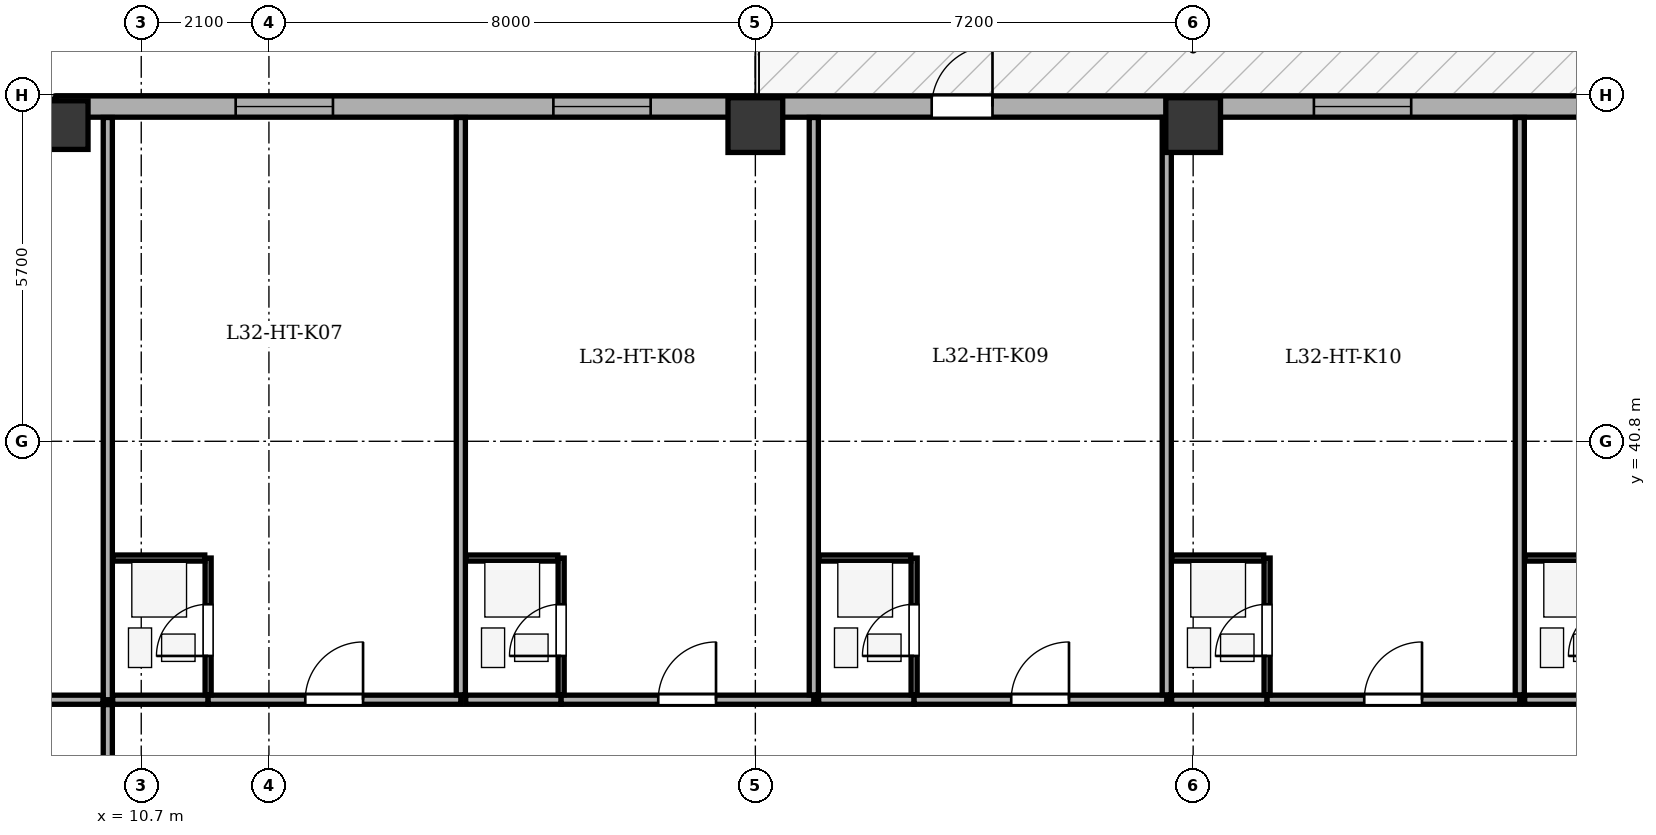
"""IFC4 building model, lengths in metres.
Left out: names, types, materials, properties, quantities, classifications, styles, units other than length and angle.
Written with IfcOpenShell. Run it as: python <this file> out.ifc"""

import sys

from ifc_helpers import new_model, si_unit, direction, frame, frame_2d, origin, origin_2d, place, context, subcontext, project, spatial, rectangle, extrude, element, fill, save


model = new_model("IFC4")
c1 = context("Model", 3, precision=1e-05, world=origin(), true_north=direction((0.0, 1.0)))
c2 = subcontext(c1, "Body", "Model", "MODEL_VIEW")
j1 = project(units=[si_unit("LENGTHUNIT", "METRE"), si_unit("PLANEANGLEUNIT", "RADIAN")], contexts=[c1])
p1 = place(None, origin())
s1 = spatial("IfcSite", under=j1, at=p1, CompositionType="ELEMENT")
p2 = place(p1, origin())
s2 = spatial("IfcBuilding", under=s1, at=p2, CompositionType="ELEMENT")
p3 = place(p2, frame((0.0, 0.0, 130.8)))
s3 = spatial("IfcBuildingStorey", under=s2, at=p3, CompositionType="ELEMENT", Elevation=130.8)
p4 = place(p3, frame((9.3, 46.0, 0.0), z_axis=(0.0, 0.0, 1.0), x_axis=(1.0, 0.0, 0.0)))
e1 = element("IfcColumn", 1, at=p4, inside=s3, PredefinedType="COLUMN", context=c2, shape_type="SweptSolid", body=[
    extrude(rectangle(XDim=0.8, YDim=1.05, at=origin_2d()), origin(), (0.0, 0.0, 1.0), 3.5),
])
for number, where, z_axis, x_axis in (
    (2, (20.8, 46.0, 0.0), (0.0, 0.0, 1.0), (1.0, 0.0, 0.0)),
    (3, (28.0, 46.0, 0.0), (0.0, 0.0, 1.0), (1.0, 0.0, 0.0)),
):
    element("IfcColumn", number, at=place(p3, frame(where, z_axis=z_axis, x_axis=x_axis)), inside=s3, PredefinedType="COLUMN", context=c2, shape_type="SweptSolid", body=[
        extrude(rectangle(XDim=0.9, YDim=0.9, at=origin_2d()), origin(), (0.0, 0.0, 1.0), 3.5),
    ])
p5 = place(p3, frame((4.495, 41.5, 0.0), z_axis=(0.0, 0.0, 1.0), x_axis=(0.707106781187, 0.707106781187, 0.0)))
e4 = element("IfcWall", 4, at=p5, inside=s3, PredefinedType="STANDARD", context=c2, shape_type="SweptSolid", body=[
    extrude(rectangle(XDim=6.795, YDim=0.35, at=frame_2d((3.397, 0.0))), origin(), (0.0, 0.0, 1.0), 2.785),
])
p6 = place(p5, frame((2.698, 0.0, 0.75)))
e5 = element("IfcOpeningElement", 5, at=p6, cuts=e4, PredefinedType="OPENING", context=c2, shape_type="SweptSolid", body=[
    extrude(rectangle(XDim=1.4, YDim=1.65, at=frame_2d((0.7, 0.825))), frame((0.0, 0.185, 0.0), z_axis=(0.0, -1.0, 0.0), x_axis=(1.0, 0.0, 0.0)), (0.0, 0.0, 1.0), 0.37),
])
p7 = place(p3, frame((9.3, 46.305, 0.0), z_axis=(0.0, 0.0, 1.0), x_axis=(1.0, 0.0, 0.0)))
e6 = element("IfcWall", 6, at=p7, inside=s3, PredefinedType="STANDARD", context=c2, shape_type="SweptSolid", body=[
    extrude(rectangle(XDim=35.0, YDim=0.35, at=frame_2d((17.5, 0.0))), origin(), (0.0, 0.0, 1.0), 2.785),
])
p8 = place(p7, frame((14.4, 0.0, 0.0)))
e7 = element("IfcOpeningElement", 7, at=p8, cuts=e6, PredefinedType="OPENING", context=c2, shape_type="SweptSolid", body=[
    extrude(rectangle(XDim=1.0, YDim=2.02, at=frame_2d((0.5, 1.01))), frame((0.0, 0.185, 0.0), z_axis=(0.0, -1.0, 0.0), x_axis=(1.0, 0.0, 0.0)), (0.0, 0.0, 1.0), 0.37),
])
p9 = place(p7, frame((2.953, 0.0, 0.75)))
e8 = element("IfcOpeningElement", 8, at=p9, cuts=e6, PredefinedType="OPENING", context=c2, shape_type="SweptSolid", body=[
    extrude(rectangle(XDim=1.6, YDim=1.75, at=frame_2d((0.8, 0.875))), frame((0.0, 0.185, 0.0), z_axis=(0.0, -1.0, 0.0), x_axis=(1.0, 0.0, 0.0)), (0.0, 0.0, 1.0), 0.37),
])
p10 = place(p7, frame((8.178, 0.0, 0.75)))
e9 = element("IfcOpeningElement", 9, at=p10, cuts=e6, PredefinedType="OPENING", context=c2, shape_type="SweptSolid", body=[
    extrude(rectangle(XDim=1.6, YDim=1.75, at=frame_2d((0.8, 0.875))), frame((0.0, 0.185, 0.0), z_axis=(0.0, -1.0, 0.0), x_axis=(1.0, 0.0, 0.0)), (0.0, 0.0, 1.0), 0.37),
])
p11 = place(p7, frame((20.686, 0.0, 0.75)))
e10 = element("IfcOpeningElement", 10, at=p11, cuts=e6, PredefinedType="OPENING", context=c2, shape_type="SweptSolid", body=[
    extrude(rectangle(XDim=1.6, YDim=1.75, at=frame_2d((0.8, 0.875))), frame((0.0, 0.185, 0.0), z_axis=(0.0, -1.0, 0.0), x_axis=(1.0, 0.0, 0.0)), (0.0, 0.0, 1.0), 0.37),
])
p12 = place(p7, frame((27.143, 0.0, 0.75)))
e11 = element("IfcOpeningElement", 11, at=p12, cuts=e6, PredefinedType="OPENING", context=c2, shape_type="SweptSolid", body=[
    extrude(rectangle(XDim=1.35, YDim=1.75, at=frame_2d((0.675, 0.875))), frame((0.0, 0.185, 0.0), z_axis=(0.0, -1.0, 0.0), x_axis=(1.0, 0.0, 0.0)), (0.0, 0.0, 1.0), 0.37),
])
p13 = place(p7, frame((31.33, 0.0, 0.75)))
e12 = element("IfcOpeningElement", 12, at=p13, cuts=e6, PredefinedType="OPENING", context=c2, shape_type="SweptSolid", body=[
    extrude(rectangle(XDim=1.6, YDim=1.75, at=frame_2d((0.8, 0.875))), frame((0.0, 0.185, 0.0), z_axis=(0.0, -1.0, 0.0), x_axis=(1.0, 0.0, 0.0)), (0.0, 0.0, 1.0), 0.37),
])
p14 = place(p3, frame((10.15, 36.55, 0.0), z_axis=(0.0, 0.0, 1.0), x_axis=(0.0, 1.0, 0.0)))
e13 = element("IfcWall", 13, at=p14, inside=s3, PredefinedType="PARTITIONING", context=c2, shape_type="SweptSolid", body=[
    extrude(rectangle(XDim=9.575, YDim=0.15, at=frame_2d((4.788, 0.0))), origin(), (0.0, 0.0, 1.0), 3.2),
])
p15 = place(p3, frame((10.23, 36.55, 0.0), z_axis=(0.0, 0.0, 1.0), x_axis=(1.0, 0.0, 0.0)))
e14 = element("IfcWall", 14, at=p15, inside=s3, PredefinedType="PARTITIONING", context=c2, shape_type="SweptSolid", body=[
    extrude(rectangle(XDim=1.57, YDim=0.15, at=frame_2d((0.785, 0.0))), origin(), (0.0, 0.0, 1.0), 3.2),
])
p16 = place(p3, frame((11.8, 36.55, 0.0), z_axis=(0.0, 0.0, 1.0), x_axis=(1.0, 0.0, 0.0)))
e15 = element("IfcWall", 15, at=p16, inside=s3, PredefinedType="PARTITIONING", context=c2, shape_type="SweptSolid", body=[
    extrude(rectangle(XDim=4.156, YDim=0.15, at=frame_2d((2.078, 0.0))), origin(), (0.0, 0.0, 1.0), 3.2),
])
p17 = place(p16, frame((1.598, 0.0, 0.0)))
e16 = element("IfcOpeningElement", 16, at=p17, cuts=e15, PredefinedType="OPENING", context=c2, shape_type="SweptSolid", body=[
    extrude(rectangle(XDim=0.95, YDim=2.1, at=frame_2d((0.475, 1.05))), frame((0.0, 0.085, 0.0), z_axis=(0.0, -1.0, 0.0), x_axis=(1.0, 0.0, 0.0)), (0.0, 0.0, 1.0), 0.17),
])
p18 = place(p3, frame((11.8, 36.63, 0.0), z_axis=(0.0, 0.0, 1.0), x_axis=(0.0, 1.0, 0.0)))
e17 = element("IfcWall", 17, at=p18, inside=s3, PredefinedType="PARTITIONING", context=c2, shape_type="SweptSolid", body=[
    extrude(rectangle(XDim=2.25, YDim=0.1, at=frame_2d((1.125, 0.0))), origin(), (0.0, 0.0, 1.0), 3.2),
])
p19 = place(p18, frame((0.64, 0.0, 0.0)))
e18 = element("IfcOpeningElement", 18, at=p19, cuts=e17, PredefinedType="OPENING", context=c2, shape_type="SweptSolid", body=[
    extrude(rectangle(XDim=0.85, YDim=2.05, at=frame_2d((0.425, 1.025))), frame((0.0, 0.06, 0.0), z_axis=(0.0, -1.0, 0.0), x_axis=(1.0, 0.0, 0.0)), (0.0, 0.0, 1.0), 0.12),
])
p20 = place(p3, frame((10.23, 38.88, 0.0), z_axis=(0.0, 0.0, 1.0), x_axis=(1.0, 0.0, 0.0)))
e19 = element("IfcWall", 19, at=p20, inside=s3, PredefinedType="PARTITIONING", context=c2, shape_type="SweptSolid", body=[
    extrude(rectangle(XDim=1.515, YDim=0.1, at=frame_2d((0.758, 0.0))), origin(), (0.0, 0.0, 1.0), 3.2),
])
p21 = place(p3, frame((15.956, 36.63, 0.0), z_axis=(0.0, 0.0, 1.0), x_axis=(0.0, 1.0, 0.0)))
e20 = element("IfcWall", 20, at=p21, inside=s3, PredefinedType="PARTITIONING", context=c2, shape_type="SweptSolid", body=[
    extrude(rectangle(XDim=9.495, YDim=0.15, at=frame_2d((4.748, 0.0))), origin(), (0.0, 0.0, 1.0), 3.2),
])
p22 = place(p3, frame((16.036, 36.55, 0.0), z_axis=(0.0, 0.0, 1.0), x_axis=(1.0, 0.0, 0.0)))
e21 = element("IfcWall", 21, at=p22, inside=s3, PredefinedType="PARTITIONING", context=c2, shape_type="SweptSolid", body=[
    extrude(rectangle(XDim=1.57, YDim=0.15, at=frame_2d((0.785, 0.0))), origin(), (0.0, 0.0, 1.0), 3.2),
])
p23 = place(p3, frame((17.606, 36.55, 0.0), z_axis=(0.0, 0.0, 1.0), x_axis=(1.0, 0.0, 0.0)))
e22 = element("IfcWall", 22, at=p23, inside=s3, PredefinedType="PARTITIONING", context=c2, shape_type="SweptSolid", body=[
    extrude(rectangle(XDim=4.155, YDim=0.15, at=frame_2d((2.078, 0.0))), origin(), (0.0, 0.0, 1.0), 3.2),
])
p24 = place(p23, frame((1.597, 0.0, 0.0)))
e23 = element("IfcOpeningElement", 23, at=p24, cuts=e22, PredefinedType="OPENING", context=c2, shape_type="SweptSolid", body=[
    extrude(rectangle(XDim=0.95, YDim=2.1, at=frame_2d((0.475, 1.05))), frame((0.0, 0.085, 0.0), z_axis=(0.0, -1.0, 0.0), x_axis=(1.0, 0.0, 0.0)), (0.0, 0.0, 1.0), 0.17),
])
p25 = place(p3, frame((17.606, 36.63, 0.0), z_axis=(0.0, 0.0, 1.0), x_axis=(0.0, 1.0, 0.0)))
e24 = element("IfcWall", 24, at=p25, inside=s3, PredefinedType="PARTITIONING", context=c2, shape_type="SweptSolid", body=[
    extrude(rectangle(XDim=2.25, YDim=0.1, at=frame_2d((1.125, 0.0))), origin(), (0.0, 0.0, 1.0), 3.2),
])
p26 = place(p25, frame((0.64, 0.0, 0.0)))
e25 = element("IfcOpeningElement", 25, at=p26, cuts=e24, PredefinedType="OPENING", context=c2, shape_type="SweptSolid", body=[
    extrude(rectangle(XDim=0.85, YDim=2.05, at=frame_2d((0.425, 1.025))), frame((0.0, 0.06, 0.0), z_axis=(0.0, -1.0, 0.0), x_axis=(1.0, 0.0, 0.0)), (0.0, 0.0, 1.0), 0.12),
])
p27 = place(p3, frame((16.036, 38.88, 0.0), z_axis=(0.0, 0.0, 1.0), x_axis=(1.0, 0.0, 0.0)))
e26 = element("IfcWall", 26, at=p27, inside=s3, PredefinedType="PARTITIONING", context=c2, shape_type="SweptSolid", body=[
    extrude(rectangle(XDim=1.515, YDim=0.1, at=frame_2d((0.758, 0.0))), origin(), (0.0, 0.0, 1.0), 3.2),
])
p28 = place(p3, frame((21.761, 36.63, 0.0), z_axis=(0.0, 0.0, 1.0), x_axis=(0.0, 1.0, 0.0)))
e27 = element("IfcWall", 27, at=p28, inside=s3, PredefinedType="PARTITIONING", context=c2, shape_type="SweptSolid", body=[
    extrude(rectangle(XDim=9.495, YDim=0.15, at=frame_2d((4.748, 0.0))), origin(), (0.0, 0.0, 1.0), 3.2),
])
p29 = place(p3, frame((21.841, 36.55, 0.0), z_axis=(0.0, 0.0, 1.0), x_axis=(1.0, 0.0, 0.0)))
e28 = element("IfcWall", 28, at=p29, inside=s3, PredefinedType="PARTITIONING", context=c2, shape_type="SweptSolid", body=[
    extrude(rectangle(XDim=1.57, YDim=0.15, at=frame_2d((0.785, 0.0))), origin(), (0.0, 0.0, 1.0), 3.2),
])
p30 = place(p3, frame((23.411, 36.55, 0.0), z_axis=(0.0, 0.0, 1.0), x_axis=(1.0, 0.0, 0.0)))
e29 = element("IfcWall", 29, at=p30, inside=s3, PredefinedType="PARTITIONING", context=c2, shape_type="SweptSolid", body=[
    extrude(rectangle(XDim=4.155, YDim=0.15, at=frame_2d((2.078, 0.0))), origin(), (0.0, 0.0, 1.0), 3.2),
])
p31 = place(p30, frame((1.597, 0.0, 0.0)))
e30 = element("IfcOpeningElement", 30, at=p31, cuts=e29, PredefinedType="OPENING", context=c2, shape_type="SweptSolid", body=[
    extrude(rectangle(XDim=0.95, YDim=2.1, at=frame_2d((0.475, 1.05))), frame((0.0, 0.085, 0.0), z_axis=(0.0, -1.0, 0.0), x_axis=(1.0, 0.0, 0.0)), (0.0, 0.0, 1.0), 0.17),
])
p32 = place(p3, frame((23.411, 36.63, 0.0), z_axis=(0.0, 0.0, 1.0), x_axis=(0.0, 1.0, 0.0)))
e31 = element("IfcWall", 31, at=p32, inside=s3, PredefinedType="PARTITIONING", context=c2, shape_type="SweptSolid", body=[
    extrude(rectangle(XDim=2.25, YDim=0.1, at=frame_2d((1.125, 0.0))), origin(), (0.0, 0.0, 1.0), 3.2),
])
p33 = place(p32, frame((0.64, 0.0, 0.0)))
e32 = element("IfcOpeningElement", 32, at=p33, cuts=e31, PredefinedType="OPENING", context=c2, shape_type="SweptSolid", body=[
    extrude(rectangle(XDim=0.85, YDim=2.05, at=frame_2d((0.425, 1.025))), frame((0.0, 0.06, 0.0), z_axis=(0.0, -1.0, 0.0), x_axis=(1.0, 0.0, 0.0)), (0.0, 0.0, 1.0), 0.12),
])
p34 = place(p3, frame((21.841, 38.88, 0.0), z_axis=(0.0, 0.0, 1.0), x_axis=(1.0, 0.0, 0.0)))
e33 = element("IfcWall", 33, at=p34, inside=s3, PredefinedType="PARTITIONING", context=c2, shape_type="SweptSolid", body=[
    extrude(rectangle(XDim=1.515, YDim=0.1, at=frame_2d((0.757, 0.0))), origin(), (0.0, 0.0, 1.0), 3.2),
])
p35 = place(p3, frame((27.566, 36.63, 0.0), z_axis=(0.0, 0.0, 1.0), x_axis=(0.0, 1.0, 0.0)))
e34 = element("IfcWall", 34, at=p35, inside=s3, PredefinedType="PARTITIONING", context=c2, shape_type="SweptSolid", body=[
    extrude(rectangle(XDim=9.495, YDim=0.15, at=frame_2d((4.748, 0.0))), origin(), (0.0, 0.0, 1.0), 3.2),
])
p36 = place(p3, frame((27.646, 36.55, 0.0), z_axis=(0.0, 0.0, 1.0), x_axis=(1.0, 0.0, 0.0)))
e35 = element("IfcWall", 35, at=p36, inside=s3, PredefinedType="PARTITIONING", context=c2, shape_type="SweptSolid", body=[
    extrude(rectangle(XDim=1.57, YDim=0.15, at=frame_2d((0.785, 0.0))), origin(), (0.0, 0.0, 1.0), 3.2),
])
p37 = place(p3, frame((29.216, 36.55, 0.0), z_axis=(0.0, 0.0, 1.0), x_axis=(1.0, 0.0, 0.0)))
e36 = element("IfcWall", 36, at=p37, inside=s3, PredefinedType="PARTITIONING", context=c2, shape_type="SweptSolid", body=[
    extrude(rectangle(XDim=4.156, YDim=0.15, at=frame_2d((2.078, 0.0))), origin(), (0.0, 0.0, 1.0), 3.2),
])
p38 = place(p37, frame((1.598, 0.0, 0.0)))
e37 = element("IfcOpeningElement", 37, at=p38, cuts=e36, PredefinedType="OPENING", context=c2, shape_type="SweptSolid", body=[
    extrude(rectangle(XDim=0.95, YDim=2.1, at=frame_2d((0.475, 1.05))), frame((0.0, 0.085, 0.0), z_axis=(0.0, -1.0, 0.0), x_axis=(1.0, 0.0, 0.0)), (0.0, 0.0, 1.0), 0.17),
])
p39 = place(p3, frame((29.216, 36.63, 0.0), z_axis=(0.0, 0.0, 1.0), x_axis=(0.0, 1.0, 0.0)))
e38 = element("IfcWall", 38, at=p39, inside=s3, PredefinedType="PARTITIONING", context=c2, shape_type="SweptSolid", body=[
    extrude(rectangle(XDim=2.25, YDim=0.1, at=frame_2d((1.125, 0.0))), origin(), (0.0, 0.0, 1.0), 3.2),
])
p40 = place(p39, frame((0.64, 0.0, 0.0)))
e39 = element("IfcOpeningElement", 39, at=p40, cuts=e38, PredefinedType="OPENING", context=c2, shape_type="SweptSolid", body=[
    extrude(rectangle(XDim=0.85, YDim=2.05, at=frame_2d((0.425, 1.025))), frame((0.0, 0.06, 0.0), z_axis=(0.0, -1.0, 0.0), x_axis=(1.0, 0.0, 0.0)), (0.0, 0.0, 1.0), 0.12),
])
p41 = place(p3, frame((27.646, 38.88, 0.0), z_axis=(0.0, 0.0, 1.0), x_axis=(1.0, 0.0, 0.0)))
e40 = element("IfcWall", 40, at=p41, inside=s3, PredefinedType="PARTITIONING", context=c2, shape_type="SweptSolid", body=[
    extrude(rectangle(XDim=1.515, YDim=0.1, at=frame_2d((0.757, 0.0))), origin(), (0.0, 0.0, 1.0), 3.2),
])
p42 = place(p3, frame((33.372, 36.63, 0.0), z_axis=(0.0, 0.0, 1.0), x_axis=(0.0, 1.0, 0.0)))
e41 = element("IfcWall", 41, at=p42, inside=s3, PredefinedType="PARTITIONING", context=c2, shape_type="SweptSolid", body=[
    extrude(rectangle(XDim=9.495, YDim=0.15, at=frame_2d((4.748, 0.0))), origin(), (0.0, 0.0, 1.0), 3.2),
])
p43 = place(p3, frame((33.452, 36.55, 0.0), z_axis=(0.0, 0.0, 1.0), x_axis=(1.0, 0.0, 0.0)))
e42 = element("IfcWall", 42, at=p43, inside=s3, PredefinedType="PARTITIONING", context=c2, shape_type="SweptSolid", body=[
    extrude(rectangle(XDim=1.57, YDim=0.15, at=frame_2d((0.785, 0.0))), origin(), (0.0, 0.0, 1.0), 3.2),
])
p44 = place(p3, frame((33.452, 38.88, 0.0), z_axis=(0.0, 0.0, 1.0), x_axis=(1.0, 0.0, 0.0)))
e43 = element("IfcWall", 43, at=p44, inside=s3, PredefinedType="PARTITIONING", context=c2, shape_type="SweptSolid", body=[
    extrude(rectangle(XDim=1.515, YDim=0.1, at=frame_2d((0.758, 0.0))), origin(), (0.0, 0.0, 1.0), 3.2),
])
p45 = place(p3, frame((4.675, 36.55, 0.0), z_axis=(0.0, 0.0, 1.0), x_axis=(1.0, 0.0, 0.0)))
e44 = element("IfcWall", 44, at=p45, inside=s3, PredefinedType="PARTITIONING", context=c2, shape_type="SweptSolid", body=[
    extrude(rectangle(XDim=5.395, YDim=0.15, at=frame_2d((2.698, 0.0))), origin(), (0.0, 0.0, 1.0), 3.2),
])
p46 = place(p3, frame((10.15, 27.28, 0.0), z_axis=(0.0, 0.0, 1.0), x_axis=(0.0, 1.0, 0.0)))
e45 = element("IfcWall", 45, at=p46, inside=s3, PredefinedType="PARTITIONING", context=c2, shape_type="SweptSolid", body=[
    extrude(rectangle(XDim=9.19, YDim=0.15, at=frame_2d((4.595, 0.0))), origin(), (0.0, 0.0, 1.0), 3.2),
])
p47 = place(p46, frame((4.115, 0.0, 0.0)))
e46 = element("IfcOpeningElement", 46, at=p47, cuts=e45, PredefinedType="OPENING", context=c2, shape_type="SweptSolid", body=[
    extrude(rectangle(XDim=0.95, YDim=2.1, at=frame_2d((0.475, 1.05))), frame((0.0, 0.085, 0.0), z_axis=(0.0, -1.0, 0.0), x_axis=(1.0, 0.0, 0.0)), (0.0, 0.0, 1.0), 0.17),
])
p48 = place(p8, origin())
e47 = element("IfcDoor", 47, at=p48, inside=s3, OperationType="SINGLE_SWING_RIGHT", PredefinedType="DOOR", context=c2, shape_type="SweptSolid", body=[
    extrude(rectangle(XDim=1.0, YDim=2.02, at=frame_2d((0.5, 1.01))), frame((0.0, 0.025, 0.0), z_axis=(0.0, -1.0, 0.0), x_axis=(1.0, 0.0, 0.0)), (0.0, 0.0, 1.0), 0.05),
])
fill(e7, e47)
p49 = place(p9, origin())
e48 = element("IfcWindow", 48, at=p49, inside=s3, PartitioningType="SINGLE_PANEL", PredefinedType="WINDOW", context=c2, shape_type="SweptSolid", body=[
    extrude(rectangle(XDim=1.6, YDim=1.75, at=frame_2d((0.8, 0.875))), frame((0.0, -0.01, 0.0), z_axis=(0.0, -1.0, 0.0), x_axis=(1.0, 0.0, 0.0)), (0.0, 0.0, 1.0), 0.06),
])
fill(e8, e48)
p50 = place(p10, origin())
e49 = element("IfcWindow", 49, at=p50, inside=s3, PartitioningType="SINGLE_PANEL", PredefinedType="WINDOW", context=c2, shape_type="SweptSolid", body=[
    extrude(rectangle(XDim=1.6, YDim=1.75, at=frame_2d((0.8, 0.875))), frame((0.0, -0.01, 0.0), z_axis=(0.0, -1.0, 0.0), x_axis=(1.0, 0.0, 0.0)), (0.0, 0.0, 1.0), 0.06),
])
fill(e9, e49)
p51 = place(p11, origin())
e50 = element("IfcWindow", 50, at=p51, inside=s3, PartitioningType="SINGLE_PANEL", PredefinedType="WINDOW", context=c2, shape_type="SweptSolid", body=[
    extrude(rectangle(XDim=1.6, YDim=1.75, at=frame_2d((0.8, 0.875))), frame((0.0, -0.01, 0.0), z_axis=(0.0, -1.0, 0.0), x_axis=(1.0, 0.0, 0.0)), (0.0, 0.0, 1.0), 0.06),
])
fill(e10, e50)
p52 = place(p19, origin())
e51 = element("IfcDoor", 51, at=p52, inside=s3, OperationType="SINGLE_SWING_LEFT", PredefinedType="DOOR", context=c2, shape_type="SweptSolid", body=[
    extrude(rectangle(XDim=0.85, YDim=2.05, at=frame_2d((0.425, 1.025))), frame((0.0, 0.025, 0.0), z_axis=(0.0, -1.0, 0.0), x_axis=(1.0, 0.0, 0.0)), (0.0, 0.0, 1.0), 0.05),
])
fill(e18, e51)
p53 = place(p17, origin())
e52 = element("IfcDoor", 52, at=p53, inside=s3, OperationType="SINGLE_SWING_RIGHT", PredefinedType="DOOR", context=c2, shape_type="SweptSolid", body=[
    extrude(rectangle(XDim=0.95, YDim=2.1, at=frame_2d((0.475, 1.05))), frame((0.0, 0.025, 0.0), z_axis=(0.0, -1.0, 0.0), x_axis=(1.0, 0.0, 0.0)), (0.0, 0.0, 1.0), 0.05),
])
fill(e16, e52)
p54 = place(p26, origin())
e53 = element("IfcDoor", 53, at=p54, inside=s3, OperationType="SINGLE_SWING_LEFT", PredefinedType="DOOR", context=c2, shape_type="SweptSolid", body=[
    extrude(rectangle(XDim=0.85, YDim=2.05, at=frame_2d((0.425, 1.025))), frame((0.0, 0.025, 0.0), z_axis=(0.0, -1.0, 0.0), x_axis=(1.0, 0.0, 0.0)), (0.0, 0.0, 1.0), 0.05),
])
fill(e25, e53)
p55 = place(p24, origin())
e54 = element("IfcDoor", 54, at=p55, inside=s3, OperationType="SINGLE_SWING_RIGHT", PredefinedType="DOOR", context=c2, shape_type="SweptSolid", body=[
    extrude(rectangle(XDim=0.95, YDim=2.1, at=frame_2d((0.475, 1.05))), frame((0.0, 0.025, 0.0), z_axis=(0.0, -1.0, 0.0), x_axis=(1.0, 0.0, 0.0)), (0.0, 0.0, 1.0), 0.05),
])
fill(e23, e54)
p56 = place(p33, origin())
e55 = element("IfcDoor", 55, at=p56, inside=s3, OperationType="SINGLE_SWING_LEFT", PredefinedType="DOOR", context=c2, shape_type="SweptSolid", body=[
    extrude(rectangle(XDim=0.85, YDim=2.05, at=frame_2d((0.425, 1.025))), frame((0.0, 0.025, 0.0), z_axis=(0.0, -1.0, 0.0), x_axis=(1.0, 0.0, 0.0)), (0.0, 0.0, 1.0), 0.05),
])
fill(e32, e55)
p57 = place(p31, origin())
e56 = element("IfcDoor", 56, at=p57, inside=s3, OperationType="SINGLE_SWING_RIGHT", PredefinedType="DOOR", context=c2, shape_type="SweptSolid", body=[
    extrude(rectangle(XDim=0.95, YDim=2.1, at=frame_2d((0.475, 1.05))), frame((0.0, 0.025, 0.0), z_axis=(0.0, -1.0, 0.0), x_axis=(1.0, 0.0, 0.0)), (0.0, 0.0, 1.0), 0.05),
])
fill(e30, e56)
p58 = place(p40, origin())
e57 = element("IfcDoor", 57, at=p58, inside=s3, OperationType="SINGLE_SWING_LEFT", PredefinedType="DOOR", context=c2, shape_type="SweptSolid", body=[
    extrude(rectangle(XDim=0.85, YDim=2.05, at=frame_2d((0.425, 1.025))), frame((0.0, 0.025, 0.0), z_axis=(0.0, -1.0, 0.0), x_axis=(1.0, 0.0, 0.0)), (0.0, 0.0, 1.0), 0.05),
])
fill(e39, e57)
p59 = place(p38, origin())
e58 = element("IfcDoor", 58, at=p59, inside=s3, OperationType="SINGLE_SWING_RIGHT", PredefinedType="DOOR", context=c2, shape_type="SweptSolid", body=[
    extrude(rectangle(XDim=0.95, YDim=2.1, at=frame_2d((0.475, 1.05))), frame((0.0, 0.025, 0.0), z_axis=(0.0, -1.0, 0.0), x_axis=(1.0, 0.0, 0.0)), (0.0, 0.0, 1.0), 0.05),
])
fill(e37, e58)
save(model, sys.argv[1])
